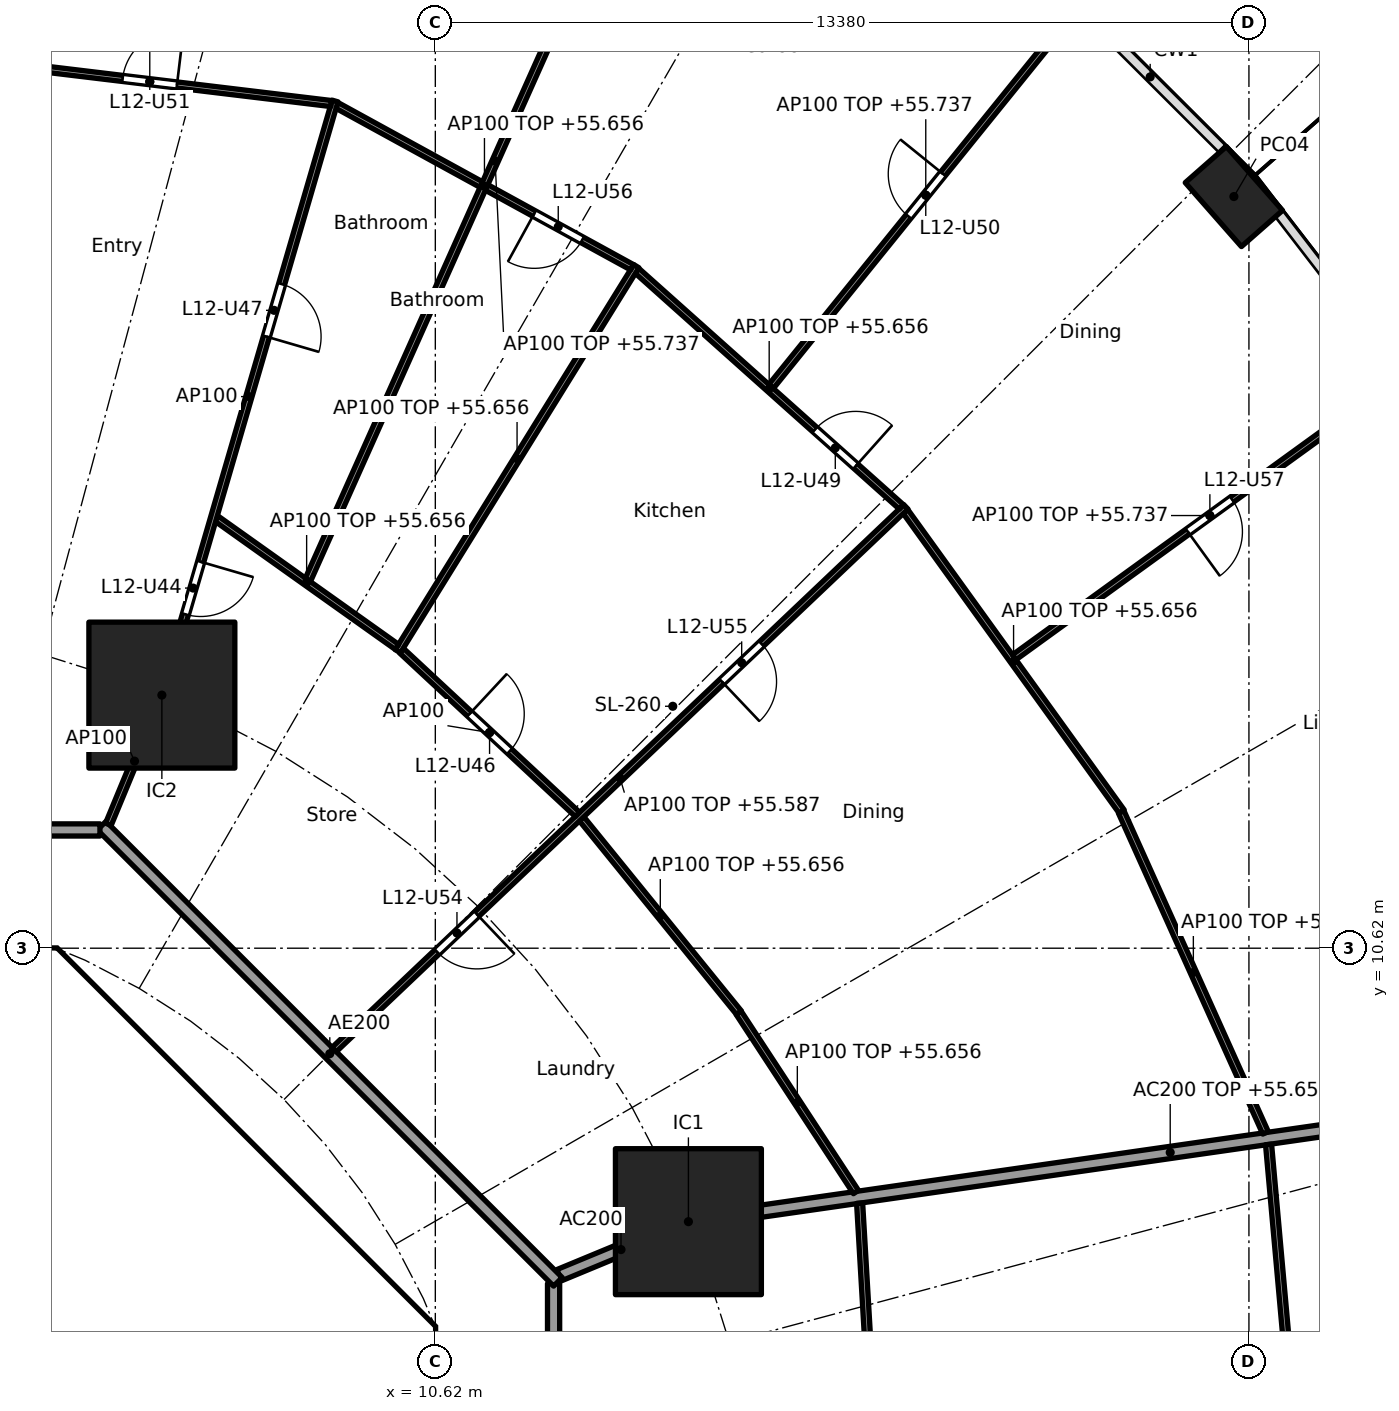
"""IFC4 building model, lengths in metres.
Left out: names, types, materials, properties, quantities, classifications, styles, units other than length and angle.
Written with IfcOpenShell. Run it as: python <this file> out.ifc"""

import sys

from ifc_helpers import new_model, si_unit, direction, frame, frame_2d, origin, origin_2d, place, context, subcontext, project, spatial, polyline, rectangle, hollow_rectangle, outline, extrude, element, fill, save


model = new_model("IFC4")
c1 = context("Model", 3, precision=1e-05, world=origin(), true_north=direction((0.0, 1.0)))
c2 = subcontext(c1, "Body", "Model", "MODEL_VIEW")
j1 = project(units=[si_unit("LENGTHUNIT", "METRE"), si_unit("PLANEANGLEUNIT", "RADIAN")], contexts=[c1])
p1 = place(None, origin())
s1 = spatial("IfcSite", under=j1, at=p1, CompositionType="ELEMENT")
p2 = place(p1, origin())
s2 = spatial("IfcBuilding", under=s1, at=p2, CompositionType="ELEMENT")
p3 = place(p2, frame((0.0, 0.0, 52.9)))
s3 = spatial("IfcBuildingStorey", under=s2, at=p3, CompositionType="ELEMENT", Elevation=52.9)
p4 = place(p3, frame((23.752, 22.981, 0.0), z_axis=(0.0, 0.0, 1.0), x_axis=(-0.660114607735, 0.751164898445, 0.0)))
e1 = element("IfcColumn", 1, at=p4, inside=s3, PredefinedType="COLUMN", context=c2, shape_type="SweptSolid", body=[
    extrude(hollow_rectangle(XDim=1.4, YDim=0.9, WallThickness=0.05, at=origin_2d()), origin(), (0.0, 0.0, 1.0), 3.7),
])
for number, where, z_axis, x_axis in (
    (2, (14.782, 6.123, 0.0), (0.0, 0.0, 1.0), (1.0, 0.0, 0.0)),
    (3, (6.123, 14.782, 0.0), (0.0, 0.0, 1.0), (1.0, 0.0, 0.0)),
):
    element("IfcColumn", number, at=place(p3, frame(where, z_axis=z_axis, x_axis=x_axis)), inside=s3, PredefinedType="COLUMN", context=c2, shape_type="SweptSolid", body=[
        extrude(rectangle(XDim=2.4, YDim=2.4, at=origin_2d()), origin(), (0.0, 0.0, 1.0), 3.7),
    ])
p5 = place(p3, frame((9.988, 4.613, 0.0), z_axis=(0.0, 0.0, 1.0), x_axis=(-0.707106781187, 0.707106781187, 0.0)))
e4 = element("IfcWall", 4, at=p5, inside=s3, PredefinedType="SHEAR", context=c2, shape_type="SweptSolid", body=[
    extrude(rectangle(XDim=7.602, YDim=0.6, at=frame_2d((3.801, 0.0))), origin(), (0.0, 0.0, 1.0), 3.44),
])
p6 = place(p5, frame((3.201, 0.0, 0.0)))
e5 = element("IfcOpeningElement", 5, at=p6, cuts=e4, PredefinedType="OPENING", context=c2, shape_type="SweptSolid", body=[
    extrude(rectangle(XDim=1.2, YDim=2.1, at=frame_2d((0.6, 1.05))), frame((0.0, 0.31, 0.0), z_axis=(0.0, -1.0, 0.0), x_axis=(1.0, 0.0, 0.0)), (0.0, 0.0, 1.0), 0.62),
])
p7 = place(p3, origin())
e6 = element("IfcWall", 6, at=p7, inside=s3, PredefinedType="SHEAR", context=c2, shape_type="SweptSolid", body=[
    extrude(outline(polyline([(-4.152, 10.025), (-4.401, 9.776), (-4.825, 10.2), (-4.401, 10.625), (4.401, 10.625), (4.825, 10.2), (4.401, 9.776), (4.152, 10.025), (-4.152, 10.025)])), origin(), (0.0, 0.0, 1.0), 3.44),
])
p8 = place(p3, origin())
e7 = element("IfcWall", 7, at=p8, inside=s3, PredefinedType="SHEAR", context=c2, shape_type="SweptSolid", body=[
    extrude(outline(polyline([(9.776, -4.401), (10.025, -4.152), (10.025, -3.801), (10.025, 4.152), (9.776, 4.401), (10.2, 4.825), (10.625, 4.401), (10.625, -4.401), (10.2, -4.825), (9.776, -4.401)])), origin(), (0.0, 0.0, 1.0), 3.44),
])
p9 = place(p3, frame((12.657, 5.243, 0.0), z_axis=(0.0, 0.0, 1.0), x_axis=(0.923853160736, 0.382747093259, 0.0)))
e8 = element("IfcWall", 8, at=p9, inside=s3, PredefinedType="PARTITIONING", context=c2, shape_type="SweptSolid", body=[
    extrude(rectangle(XDim=2.2, YDim=0.2, at=frame_2d((1.1, 0.0))), origin(), (0.0, 0.0, 1.0), 3.44),
])
p10 = place(p3, frame((14.832, 6.13, 0.0), z_axis=(0.0, 0.0, 1.0), x_axis=(0.989836541293, 0.142209779978, 0.0)))
e9 = element("IfcWall", 9, at=p10, inside=s3, PredefinedType="PARTITIONING", context=c2, shape_type="SweptSolid", body=[
    extrude(rectangle(XDim=15.909, YDim=0.2, at=frame_2d((7.955, 0.0))), origin(), (0.0, 0.0, 1.0), 2.756),
])
p11 = place(p3, frame((12.565, -5.104, 0.0), z_axis=(0.0, 0.0, 1.0), x_axis=(0.0, 1.0, 0.0)))
e10 = element("IfcWall", 10, at=p11, inside=s3, PredefinedType="PARTITIONING", context=c2, shape_type="SweptSolid", body=[
    extrude(rectangle(XDim=10.209, YDim=0.2, at=frame_2d((5.104, 0.0))), origin(), (0.0, 0.0, 1.0), 3.44),
])
p12 = place(p3, frame((12.635, 5.134, 0.0), z_axis=(0.0, 0.0, 1.0), x_axis=(-0.707106781187, 0.707106781187, 0.0)))
e11 = element("IfcWall", 11, at=p12, inside=s3, PredefinedType="PARTITIONING", context=c2, shape_type="SweptSolid", body=[
    extrude(rectangle(XDim=10.609, YDim=0.2, at=frame_2d((5.305, 0.0))), origin(), (0.0, 0.0, 1.0), 3.44),
])
p13 = place(p3, frame((5.104, 12.565, 0.0), z_axis=(0.0, 0.0, 1.0), x_axis=(-1.0, 0.0, 0.0)))
e12 = element("IfcWall", 12, at=p13, inside=s3, PredefinedType="PARTITIONING", context=c2, shape_type="SweptSolid", body=[
    extrude(rectangle(XDim=10.409, YDim=0.2, at=frame_2d((5.205, 0.0))), origin(), (0.0, 0.0, 1.0), 3.44),
])
p14 = place(p13, frame((1.185, 0.0, 0.0)))
e13 = element("IfcOpeningElement", 13, at=p14, cuts=e12, PredefinedType="OPENING", context=c2, shape_type="SweptSolid", body=[
    extrude(rectangle(XDim=1.0, YDim=2.1, at=frame_2d((0.5, 1.05))), frame((0.0, 0.11, 0.0), z_axis=(0.0, -1.0, 0.0), x_axis=(1.0, 0.0, 0.0)), (0.0, 0.0, 1.0), 0.22),
])
p15 = place(p3, frame((17.971, 0.05, 0.0), z_axis=(0.0, 0.0, 1.0), x_axis=(-0.058513659907, 0.998286607946, 0.0)))
e14 = element("IfcWall", 14, at=p15, inside=s3, PredefinedType="PARTITIONING", context=c2, shape_type="SweptSolid", body=[
    extrude(rectangle(XDim=6.388, YDim=0.1, at=frame_2d((3.194, 0.0))), origin(), (0.0, 0.0, 1.0), 2.756),
])
p16 = place(p3, frame((24.982, 0.05, 0.0), z_axis=(0.0, 0.0, 1.0), x_axis=(-0.08944290521, 0.995991951126, 0.0)))
e15 = element("IfcWall", 15, at=p16, inside=s3, PredefinedType="PARTITIONING", context=c2, shape_type="SweptSolid", body=[
    extrude(rectangle(XDim=7.373, YDim=0.1, at=frame_2d((3.686, 0.0))), origin(), (0.0, 0.0, 1.0), 2.756),
])
p17 = place(p3, frame((17.537, 6.61, 0.0), z_axis=(0.0, 0.0, 1.0), x_axis=(-0.547637987196, 0.836715384692, 0.0)))
e16 = element("IfcWall", 16, at=p17, inside=s3, PredefinedType="PARTITIONING", context=c2, shape_type="SweptSolid", body=[
    extrude(rectangle(XDim=3.52, YDim=0.1, at=frame_2d((1.76, 0.0))), origin(), (0.0, 0.0, 1.0), 2.756),
])
p18 = place(p3, frame((24.273, 7.584, 0.0), z_axis=(0.0, 0.0, 1.0), x_axis=(-0.410201529109, 0.911994904326, 0.0)))
e17 = element("IfcWall", 17, at=p18, inside=s3, PredefinedType="PARTITIONING", context=c2, shape_type="SweptSolid", body=[
    extrude(rectangle(XDim=5.787, YDim=0.1, at=frame_2d((2.894, 0.0))), origin(), (0.0, 0.0, 1.0), 2.756),
])
p19 = place(p3, frame((15.614, 9.559, 0.0), z_axis=(0.0, 0.0, 1.0), x_axis=(-0.63012473344, 0.776493928056, 0.0)))
e18 = element("IfcWall", 18, at=p19, inside=s3, PredefinedType="PARTITIONING", context=c2, shape_type="SweptSolid", body=[
    extrude(rectangle(XDim=4.106, YDim=0.1, at=frame_2d((2.053, 0.0))), origin(), (0.0, 0.0, 1.0), 2.756),
])
p20 = place(p3, frame((21.908, 12.866, 0.0), z_axis=(0.0, 0.0, 1.0), x_axis=(-0.584558392935, 0.811351640936, 0.0)))
e19 = element("IfcWall", 19, at=p20, inside=s3, PredefinedType="PARTITIONING", context=c2, shape_type="SweptSolid", body=[
    extrude(rectangle(XDim=6.084, YDim=0.1, at=frame_2d((3.042, 0.0))), origin(), (0.0, 0.0, 1.0), 2.756),
])
p21 = place(p3, frame((20.141, 15.405, 0.0), z_axis=(0.0, 0.0, 1.0), x_axis=(0.809834895779, 0.58665785734, 0.0)))
e20 = element("IfcWall", 20, at=p21, inside=s3, PredefinedType="PARTITIONING", context=c2, shape_type="SweptSolid", body=[
    extrude(rectangle(XDim=7.945, YDim=0.1, at=frame_2d((3.973, 0.0))), origin(), (0.0, 0.0, 1.0), 2.837),
])
p22 = place(p21, frame((3.522, 0.0, 0.0)))
e21 = element("IfcOpeningElement", 21, at=p22, cuts=e20, PredefinedType="OPENING", context=c2, shape_type="SweptSolid", body=[
    extrude(rectangle(XDim=0.9, YDim=2.1, at=frame_2d((0.45, 1.05))), frame((0.0, 0.06, 0.0), z_axis=(0.0, -1.0, 0.0), x_axis=(1.0, 0.0, 0.0)), (0.0, 0.0, 1.0), 0.12),
])
p23 = place(p3, frame((8.957, 8.953, 0.0), z_axis=(0.0, 0.0, 1.0), x_axis=(0.725250022034, 0.688485588476, 0.0)))
e22 = element("IfcWall", 22, at=p23, inside=s3, PredefinedType="PARTITIONING", context=c2, shape_type="SweptSolid", body=[
    extrude(rectangle(XDim=12.963, YDim=0.1, at=frame_2d((6.481, 0.0))), origin(), (0.0, 0.0, 1.0), 2.687),
])
p24 = place(p23, frame((2.333, 0.0, 0.0)))
e23 = element("IfcOpeningElement", 23, at=p24, cuts=e22, PredefinedType="OPENING", context=c2, shape_type="SweptSolid", body=[
    extrude(rectangle(XDim=0.9, YDim=2.1, at=frame_2d((0.45, 1.05))), frame((0.0, 0.06, 0.0), z_axis=(0.0, -1.0, 0.0), x_axis=(1.0, 0.0, 0.0)), (0.0, 0.0, 1.0), 0.12),
])
p25 = place(p23, frame((8.79, 0.0, 0.0)))
e24 = element("IfcOpeningElement", 24, at=p25, cuts=e22, PredefinedType="OPENING", context=c2, shape_type="SweptSolid", body=[
    extrude(rectangle(XDim=0.9, YDim=2.1, at=frame_2d((0.45, 1.05))), frame((0.0, 0.06, 0.0), z_axis=(0.0, -1.0, 0.0), x_axis=(1.0, 0.0, 0.0)), (0.0, 0.0, 1.0), 0.12),
])
p26 = place(p3, frame((12.958, 12.82, 0.0), z_axis=(0.0, 0.0, 1.0), x_axis=(-0.732022571638, 0.681280378855, 0.0)))
e25 = element("IfcWall", 25, at=p26, inside=s3, PredefinedType="PARTITIONING", context=c2, shape_type="SweptSolid", body=[
    extrude(rectangle(XDim=3.95, YDim=0.1, at=frame_2d((1.975, 0.0))), origin(), (0.0, 0.0, 1.0), 3.44),
])
p27 = place(p26, frame((1.525, 0.0, 0.0)))
e26 = element("IfcOpeningElement", 26, at=p27, cuts=e25, PredefinedType="OPENING", context=c2, shape_type="SweptSolid", body=[
    extrude(rectangle(XDim=0.9, YDim=2.1, at=frame_2d((0.45, 1.05))), frame((0.0, 0.06, 0.0), z_axis=(0.0, -1.0, 0.0), x_axis=(1.0, 0.0, 0.0)), (0.0, 0.0, 1.0), 0.12),
])
p28 = place(p3, frame((18.285, 17.877, 0.0), z_axis=(0.0, 0.0, 1.0), x_axis=(-0.745806142791, 0.666163041136, 0.0)))
e27 = element("IfcWall", 27, at=p28, inside=s3, PredefinedType="PARTITIONING", context=c2, shape_type="SweptSolid", body=[
    extrude(rectangle(XDim=5.831, YDim=0.1, at=frame_2d((2.915, 0.0))), origin(), (0.0, 0.0, 1.0), 2.756),
])
p29 = place(p28, frame((1.008, 0.0, 0.0)))
e28 = element("IfcOpeningElement", 28, at=p29, cuts=e27, PredefinedType="OPENING", context=c2, shape_type="SweptSolid", body=[
    extrude(rectangle(XDim=0.9, YDim=2.1, at=frame_2d((0.45, 1.05))), frame((0.0, 0.06, 0.0), z_axis=(0.0, -1.0, 0.0), x_axis=(1.0, 0.0, 0.0)), (0.0, 0.0, 1.0), 0.12),
])
p30 = place(p3, frame((16.142, 19.858, 0.0), z_axis=(0.0, 0.0, 1.0), x_axis=(0.628738066508, 0.777617157555, 0.0)))
e29 = element("IfcWall", 29, at=p30, inside=s3, PredefinedType="PARTITIONING", context=c2, shape_type="SweptSolid", body=[
    extrude(rectangle(XDim=8.091, YDim=0.1, at=frame_2d((4.045, 0.0))), origin(), (0.0, 0.0, 1.0), 2.837),
])
p31 = place(p30, frame((3.595, 0.0, 0.0)))
e30 = element("IfcOpeningElement", 30, at=p31, cuts=e29, PredefinedType="OPENING", context=c2, shape_type="SweptSolid", body=[
    extrude(rectangle(XDim=0.9, YDim=2.1, at=frame_2d((0.45, 1.05))), frame((0.0, 0.06, 0.0), z_axis=(0.0, -1.0, 0.0), x_axis=(1.0, 0.0, 0.0)), (0.0, 0.0, 1.0), 0.12),
])
p32 = place(p3, frame((10.003, 15.503, 0.0), z_axis=(0.0, 0.0, 1.0), x_axis=(0.52645953022, 0.850200189979, 0.0)))
e31 = element("IfcWall", 31, at=p32, inside=s3, PredefinedType="PARTITIONING", context=c2, shape_type="SweptSolid", body=[
    extrude(rectangle(XDim=7.45, YDim=0.1, at=frame_2d((3.725, 0.0))), origin(), (0.0, 0.0, 1.0), 2.756),
])
p33 = place(p3, frame((9.989, 15.574, 0.0), z_axis=(0.0, 0.0, 1.0), x_axis=(-0.81494477814, 0.57953861699, 0.0)))
e32 = element("IfcWall", 32, at=p33, inside=s3, PredefinedType="PARTITIONING", context=c2, shape_type="SweptSolid", body=[
    extrude(rectangle(XDim=3.644, YDim=0.1, at=frame_2d((1.822, 0.0))), origin(), (0.0, 0.0, 1.0), 2.756),
])
p34 = place(p3, frame((13.855, 21.818, 0.0), z_axis=(0.0, 0.0, 1.0), x_axis=(-0.876794415294, 0.480865421203, 0.0)))
e33 = element("IfcWall", 33, at=p34, inside=s3, PredefinedType="PARTITIONING", context=c2, shape_type="SweptSolid", body=[
    extrude(rectangle(XDim=5.536, YDim=0.1, at=frame_2d((2.768, 0.0))), origin(), (0.0, 0.0, 1.0), 2.756),
])
p35 = place(p34, frame((0.934, 0.0, 0.0)))
e34 = element("IfcOpeningElement", 34, at=p35, cuts=e33, PredefinedType="OPENING", context=c2, shape_type="SweptSolid", body=[
    extrude(rectangle(XDim=0.9, YDim=2.1, at=frame_2d((0.45, 1.05))), frame((0.0, 0.06, 0.0), z_axis=(0.0, -1.0, 0.0), x_axis=(1.0, 0.0, 0.0)), (0.0, 0.0, 1.0), 0.12),
])
p36 = place(p3, frame((8.524, 16.676, 0.0), z_axis=(0.0, 0.0, 1.0), x_axis=(0.408065177262, 0.912952797852, 0.0)))
e35 = element("IfcWall", 35, at=p36, inside=s3, PredefinedType="PARTITIONING", context=c2, shape_type="SweptSolid", body=[
    extrude(rectangle(XDim=15.089, YDim=0.1, at=frame_2d((7.544, 0.0))), origin(), (0.0, 0.0, 1.0), 2.837),
])
p37 = place(p3, frame((5.243, 12.657, 0.0), z_axis=(0.0, 0.0, 1.0), x_axis=(0.382719158442, 0.923864733477, 0.0)))
e36 = element("IfcWall", 36, at=p37, inside=s3, PredefinedType="PARTITIONING", context=c2, shape_type="SweptSolid", body=[
    extrude(rectangle(XDim=2.25, YDim=0.1, at=frame_2d((1.125, 0.0))), origin(), (0.0, 0.0, 1.0), 3.44),
])
p38 = place(p3, frame((6.137, 14.83, 0.0), z_axis=(0.0, 0.0, 1.0), x_axis=(0.279843546189, 0.960045618529, 0.0)))
e37 = element("IfcWall", 37, at=p38, inside=s3, PredefinedType="PARTITIONING", context=c2, shape_type="SweptSolid", body=[
    extrude(rectangle(XDim=10.127, YDim=0.1, at=frame_2d((5.063, 0.0))), origin(), (0.0, 0.0, 1.0), 3.44),
])
p39 = place(p38, frame((1.334, 0.0, 0.0)))
e38 = element("IfcOpeningElement", 38, at=p39, cuts=e37, PredefinedType="OPENING", context=c2, shape_type="SweptSolid", body=[
    extrude(rectangle(XDim=0.9, YDim=2.1, at=frame_2d((0.45, 1.05))), frame((0.0, 0.06, 0.0), z_axis=(0.0, -1.0, 0.0), x_axis=(1.0, 0.0, 0.0)), (0.0, 0.0, 1.0), 0.12),
])
p40 = place(p38, frame((6.091, 0.0, 0.0)))
e39 = element("IfcOpeningElement", 39, at=p40, cuts=e37, PredefinedType="OPENING", context=c2, shape_type="SweptSolid", body=[
    extrude(rectangle(XDim=0.9, YDim=2.1, at=frame_2d((0.45, 1.05))), frame((0.0, 0.06, 0.0), z_axis=(0.0, -1.0, 0.0), x_axis=(1.0, 0.0, 0.0)), (0.0, 0.0, 1.0), 0.12),
])
p41 = place(p3, frame((8.907, 24.51, 0.0), z_axis=(0.0, 0.0, 1.0), x_axis=(-0.992836798252, 0.119478416615, 0.0)))
e40 = element("IfcWall", 40, at=p41, inside=s3, PredefinedType="PARTITIONING", context=c2, shape_type="SweptSolid", body=[
    extrude(rectangle(XDim=6.01, YDim=0.1, at=frame_2d((3.005, 0.0))), origin(), (0.0, 0.0, 1.0), 2.756),
])
p42 = place(p41, frame((2.555, 0.0, 0.0)))
e41 = element("IfcOpeningElement", 41, at=p42, cuts=e40, PredefinedType="OPENING", context=c2, shape_type="SweptSolid", body=[
    extrude(rectangle(XDim=0.9, YDim=2.1, at=frame_2d((0.45, 1.05))), frame((0.0, 0.06, 0.0), z_axis=(0.0, -1.0, 0.0), x_axis=(1.0, 0.0, 0.0)), (0.0, 0.0, 1.0), 0.12),
])
p43 = place(p6, origin())
e42 = element("IfcDoor", 42, at=p43, inside=s3, OperationType="SINGLE_SWING_LEFT", PredefinedType="DOOR", context=c2, shape_type="SweptSolid", body=[
    extrude(rectangle(XDim=1.2, YDim=2.1, at=frame_2d((0.6, 1.05))), frame((0.0, 0.025, 0.0), z_axis=(0.0, -1.0, 0.0), x_axis=(1.0, 0.0, 0.0)), (0.0, 0.0, 1.0), 0.05),
])
fill(e5, e42)
p44 = place(p39, frame((0.9, 0.0, 0.0), x_axis=(-1.0, 0.0, 0.0)))
e43 = element("IfcDoor", 43, at=p44, inside=s3, OperationType="SINGLE_SWING_LEFT", PredefinedType="DOOR", context=c2, shape_type="SweptSolid", body=[
    extrude(rectangle(XDim=0.9, YDim=2.1, at=frame_2d((0.45, 1.05))), frame((0.0, 0.025, 0.0), z_axis=(0.0, -1.0, 0.0), x_axis=(1.0, 0.0, 0.0)), (0.0, 0.0, 1.0), 0.05),
])
fill(e38, e43)
p45 = place(p27, frame((0.9, 0.0, 0.0), x_axis=(-1.0, 0.0, 0.0)))
e44 = element("IfcDoor", 44, at=p45, inside=s3, OperationType="SINGLE_SWING_LEFT", PredefinedType="DOOR", context=c2, shape_type="SweptSolid", body=[
    extrude(rectangle(XDim=0.9, YDim=2.1, at=frame_2d((0.45, 1.05))), frame((0.0, 0.025, 0.0), z_axis=(0.0, -1.0, 0.0), x_axis=(1.0, 0.0, 0.0)), (0.0, 0.0, 1.0), 0.05),
])
fill(e26, e44)
p46 = place(p40, frame((0.9, 0.0, 0.0), x_axis=(-1.0, 0.0, 0.0)))
e45 = element("IfcDoor", 45, at=p46, inside=s3, OperationType="SINGLE_SWING_RIGHT", PredefinedType="DOOR", context=c2, shape_type="SweptSolid", body=[
    extrude(rectangle(XDim=0.9, YDim=2.1, at=frame_2d((0.45, 1.05))), frame((0.0, 0.025, 0.0), z_axis=(0.0, -1.0, 0.0), x_axis=(1.0, 0.0, 0.0)), (0.0, 0.0, 1.0), 0.05),
])
fill(e39, e45)
p47 = place(p29, frame((0.9, 0.0, 0.0), x_axis=(-1.0, 0.0, 0.0)))
e46 = element("IfcDoor", 46, at=p47, inside=s3, OperationType="SINGLE_SWING_RIGHT", PredefinedType="DOOR", context=c2, shape_type="SweptSolid", body=[
    extrude(rectangle(XDim=0.9, YDim=2.1, at=frame_2d((0.45, 1.05))), frame((0.0, 0.025, 0.0), z_axis=(0.0, -1.0, 0.0), x_axis=(1.0, 0.0, 0.0)), (0.0, 0.0, 1.0), 0.05),
])
fill(e28, e46)
p48 = place(p31, origin())
e47 = element("IfcDoor", 47, at=p48, inside=s3, OperationType="SINGLE_SWING_RIGHT", PredefinedType="DOOR", context=c2, shape_type="SweptSolid", body=[
    extrude(rectangle(XDim=0.9, YDim=2.1, at=frame_2d((0.45, 1.05))), frame((0.0, 0.025, 0.0), z_axis=(0.0, -1.0, 0.0), x_axis=(1.0, 0.0, 0.0)), (0.0, 0.0, 1.0), 0.05),
])
fill(e30, e47)
p49 = place(p42, frame((0.9, 0.0, 0.0), x_axis=(-1.0, 0.0, 0.0)))
e48 = element("IfcDoor", 48, at=p49, inside=s3, OperationType="SINGLE_SWING_RIGHT", PredefinedType="DOOR", context=c2, shape_type="SweptSolid", body=[
    extrude(rectangle(XDim=0.9, YDim=2.1, at=frame_2d((0.45, 1.05))), frame((0.0, 0.025, 0.0), z_axis=(0.0, -1.0, 0.0), x_axis=(1.0, 0.0, 0.0)), (0.0, 0.0, 1.0), 0.05),
])
fill(e41, e48)
p50 = place(p24, frame((0.9, 0.0, 0.0), x_axis=(-1.0, 0.0, 0.0)))
e49 = element("IfcDoor", 49, at=p50, inside=s3, OperationType="SINGLE_SWING_LEFT", PredefinedType="DOOR", context=c2, shape_type="SweptSolid", body=[
    extrude(rectangle(XDim=0.9, YDim=2.1, at=frame_2d((0.45, 1.05))), frame((0.0, 0.025, 0.0), z_axis=(0.0, -1.0, 0.0), x_axis=(1.0, 0.0, 0.0)), (0.0, 0.0, 1.0), 0.05),
])
fill(e23, e49)
p51 = place(p25, frame((0.9, 0.0, 0.0), x_axis=(-1.0, 0.0, 0.0)))
e50 = element("IfcDoor", 50, at=p51, inside=s3, OperationType="SINGLE_SWING_RIGHT", PredefinedType="DOOR", context=c2, shape_type="SweptSolid", body=[
    extrude(rectangle(XDim=0.9, YDim=2.1, at=frame_2d((0.45, 1.05))), frame((0.0, 0.025, 0.0), z_axis=(0.0, -1.0, 0.0), x_axis=(1.0, 0.0, 0.0)), (0.0, 0.0, 1.0), 0.05),
])
fill(e24, e50)
p52 = place(p35, origin())
e51 = element("IfcDoor", 51, at=p52, inside=s3, OperationType="SINGLE_SWING_RIGHT", PredefinedType="DOOR", context=c2, shape_type="SweptSolid", body=[
    extrude(rectangle(XDim=0.9, YDim=2.1, at=frame_2d((0.45, 1.05))), frame((0.0, 0.025, 0.0), z_axis=(0.0, -1.0, 0.0), x_axis=(1.0, 0.0, 0.0)), (0.0, 0.0, 1.0), 0.05),
])
fill(e34, e51)
p53 = place(p22, frame((0.9, 0.0, 0.0), x_axis=(-1.0, 0.0, 0.0)))
e52 = element("IfcDoor", 52, at=p53, inside=s3, OperationType="SINGLE_SWING_RIGHT", PredefinedType="DOOR", context=c2, shape_type="SweptSolid", body=[
    extrude(rectangle(XDim=0.9, YDim=2.1, at=frame_2d((0.45, 1.05))), frame((0.0, 0.025, 0.0), z_axis=(0.0, -1.0, 0.0), x_axis=(1.0, 0.0, 0.0)), (0.0, 0.0, 1.0), 0.05),
])
fill(e21, e52)
save(model, sys.argv[1])
